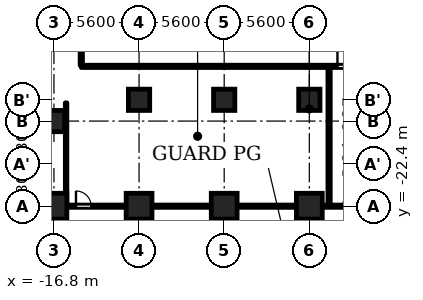
"""IFC4 building model, lengths in metres.
Left out: names, types, materials, properties, quantities, classifications, styles, units other than length and angle.
Written with IfcOpenShell. Run it as: python <this file> out.ifc"""

import sys

from ifc_helpers import new_model, si_unit, direction, frame, frame_2d, origin, origin_2d, place, context, subcontext, project, spatial, rectangle, extrude, element, fill, save


model = new_model("IFC4")
c1 = context("Model", 3, precision=1e-05, world=origin(), true_north=direction((0.0, 1.0)))
c2 = subcontext(c1, "Body", "Model", "MODEL_VIEW")
j1 = project(units=[si_unit("LENGTHUNIT", "METRE"), si_unit("PLANEANGLEUNIT", "RADIAN")], contexts=[c1])
p1 = place(None, origin())
s1 = spatial("IfcSite", under=j1, at=p1, CompositionType="ELEMENT")
p2 = place(p1, origin())
s2 = spatial("IfcBuilding", under=s1, at=p2, CompositionType="ELEMENT")
p3 = place(p2, frame((0.0, 0.0, 6.5)))
s3 = spatial("IfcBuildingStorey", under=s2, at=p3, CompositionType="ELEMENT", Elevation=6.5)
for number, where, z_axis, x_axis in (
    (1, (-16.8, -22.4, 0.0), (0.0, 0.0, 1.0), (1.0, 0.0, 0.0)),
    (2, (-11.2, -22.4, 0.0), (0.0, 0.0, 1.0), (1.0, 0.0, 0.0)),
    (3, (-5.6, -22.4, 0.0), (0.0, 0.0, 1.0), (1.0, 0.0, 0.0)),
    (4, (0.0, -22.4, 0.0), (0.0, 0.0, 1.0), (1.0, 0.0, 0.0)),
):
    element("IfcColumn", number, at=place(p3, frame(where, z_axis=z_axis, x_axis=x_axis)), inside=s3, PredefinedType="COLUMN", context=c2, shape_type="SweptSolid", body=[
        extrude(rectangle(XDim=1.7, YDim=1.7, at=origin_2d()), origin(), (0.0, 0.0, 1.0), 4.8),
    ])
for number, where, z_axis, x_axis in (
    (5, (-16.8, -16.8, 0.0), (0.0, 0.0, 1.0), (1.0, 0.0, 0.0)),
    (6, (-11.2, -15.4, 0.0), (0.0, 0.0, 1.0), (1.0, 0.0, 0.0)),
    (7, (-5.6, -15.4, 0.0), (0.0, 0.0, 1.0), (1.0, 0.0, 0.0)),
    (8, (0.0, -15.4, 0.0), (0.0, 0.0, 1.0), (1.0, 0.0, 0.0)),
):
    element("IfcColumn", number, at=place(p3, frame(where, z_axis=z_axis, x_axis=x_axis)), inside=s3, PredefinedType="COLUMN", context=c2, shape_type="SweptSolid", body=[
        extrude(rectangle(XDim=1.4, YDim=1.4, at=origin_2d()), origin(), (0.0, 0.0, 1.0), 4.8),
    ])
p4 = place(p3, frame((-18.98, -22.4, 0.0), z_axis=(0.0, 0.0, 1.0), x_axis=(1.0, 0.0, 0.0)))
e9 = element("IfcWall", 9, at=p4, inside=s3, PredefinedType="PARTITIONING", context=c2, shape_type="SweptSolid", body=[
    extrude(rectangle(XDim=38.211, YDim=0.15, at=frame_2d((19.105, 0.0))), origin(), (0.0, 0.0, 1.0), 3.55),
])
p5 = place(p4, frame((21.18, 0.0, 0.0)))
e10 = element("IfcOpeningElement", 10, at=p5, cuts=e9, PredefinedType="OPENING", context=c2, shape_type="SweptSolid", body=[
    extrude(rectangle(XDim=1.2, YDim=2.1, at=frame_2d((0.6, 1.05))), frame((0.0, 0.085, 0.0), z_axis=(0.0, -1.0, 0.0), x_axis=(1.0, 0.0, 0.0)), (0.0, 0.0, 1.0), 0.17),
])
p6 = place(p4, frame((0.08, 0.0, 0.0)))
e11 = element("IfcOpeningElement", 11, at=p6, cuts=e9, PredefinedType="OPENING", context=c2, shape_type="SweptSolid", body=[
    extrude(rectangle(XDim=1.0, YDim=2.1, at=frame_2d((0.5, 1.05))), frame((0.0, 0.085, 0.0), z_axis=(0.0, -1.0, 0.0), x_axis=(1.0, 0.0, 0.0)), (0.0, 0.0, 1.0), 0.17),
])
p7 = place(p4, frame((3.63, 0.0, 0.0)))
e12 = element("IfcOpeningElement", 12, at=p7, cuts=e9, PredefinedType="OPENING", context=c2, shape_type="SweptSolid", body=[
    extrude(rectangle(XDim=1.0, YDim=2.1, at=frame_2d((0.5, 1.05))), frame((0.0, 0.085, 0.0), z_axis=(0.0, -1.0, 0.0), x_axis=(1.0, 0.0, 0.0)), (0.0, 0.0, 1.0), 0.17),
])
p8 = place(p4, frame((27.93, 0.0, 0.0)))
e13 = element("IfcOpeningElement", 13, at=p8, cuts=e9, PredefinedType="OPENING", context=c2, shape_type="SweptSolid", body=[
    extrude(rectangle(XDim=0.9, YDim=2.1, at=frame_2d((0.45, 1.05))), frame((0.0, 0.085, 0.0), z_axis=(0.0, -1.0, 0.0), x_axis=(1.0, 0.0, 0.0)), (0.0, 0.0, 1.0), 0.17),
])
p9 = place(p4, frame((31.18, 0.0, 0.0)))
e14 = element("IfcOpeningElement", 14, at=p9, cuts=e9, PredefinedType="OPENING", context=c2, shape_type="SweptSolid", body=[
    extrude(rectangle(XDim=0.9, YDim=2.1, at=frame_2d((0.45, 1.05))), frame((0.0, 0.085, 0.0), z_axis=(0.0, -1.0, 0.0), x_axis=(1.0, 0.0, 0.0)), (0.0, 0.0, 1.0), 0.17),
])
p10 = place(p4, frame((33.88, 0.0, 0.0)))
e15 = element("IfcOpeningElement", 15, at=p10, cuts=e9, PredefinedType="OPENING", context=c2, shape_type="SweptSolid", body=[
    extrude(rectangle(XDim=0.9, YDim=2.1, at=frame_2d((0.45, 1.05))), frame((0.0, 0.085, 0.0), z_axis=(0.0, -1.0, 0.0), x_axis=(1.0, 0.0, 0.0)), (0.0, 0.0, 1.0), 0.17),
])
p11 = place(p4, frame((37.231, 0.0, 0.0)))
e16 = element("IfcOpeningElement", 16, at=p11, cuts=e9, PredefinedType="OPENING", context=c2, shape_type="SweptSolid", body=[
    extrude(rectangle(XDim=0.9, YDim=2.1, at=frame_2d((0.45, 1.05))), frame((0.0, 0.085, 0.0), z_axis=(0.0, -1.0, 0.0), x_axis=(1.0, 0.0, 0.0)), (0.0, 0.0, 1.0), 0.17),
])
p12 = place(p3, frame((-15.005, -13.2, 0.0), z_axis=(0.0, 0.0, 1.0), x_axis=(1.0, 0.0, 0.0)))
e17 = element("IfcWall", 17, at=p12, inside=s3, PredefinedType="PARTITIONING", context=c2, shape_type="SweptSolid", body=[
    extrude(rectangle(XDim=30.01, YDim=0.15, at=frame_2d((15.005, 0.0))), origin(), (0.0, 0.0, 1.0), 4.45),
])
p13 = place(p12, frame((16.855, 0.0, 0.0)))
e18 = element("IfcOpeningElement", 18, at=p13, cuts=e17, PredefinedType="OPENING", context=c2, shape_type="SweptSolid", body=[
    extrude(rectangle(XDim=1.8, YDim=2.1, at=frame_2d((0.9, 1.05))), frame((0.0, 0.085, 0.0), z_axis=(0.0, -1.0, 0.0), x_axis=(1.0, 0.0, 0.0)), (0.0, 0.0, 1.0), 0.17),
])
p14 = place(p3, frame((-16.0, -22.325, 0.0), z_axis=(0.0, 0.0, 1.0), x_axis=(0.0, 1.0, 0.0)))
e19 = element("IfcWall", 19, at=p14, inside=s3, PredefinedType="PARTITIONING", context=c2, shape_type="SweptSolid", body=[
    extrude(rectangle(XDim=6.725, YDim=0.1, at=frame_2d((3.362, 0.0))), origin(), (0.0, 0.0, 1.0), 4.45),
])
p15 = place(p3, frame((-15.0, -13.125, 0.0), z_axis=(0.0, 0.0, 1.0), x_axis=(0.0, 1.0, 0.0)))
e20 = element("IfcWall", 20, at=p15, inside=s3, PredefinedType="PARTITIONING", context=c2, shape_type="SweptSolid", body=[
    extrude(rectangle(XDim=6.356, YDim=0.15, at=frame_2d((3.178, 0.0))), origin(), (0.0, 0.0, 1.0), 4.45),
])
p16 = place(p3, frame((1.3, -22.325, 0.0), z_axis=(0.0, 0.0, 1.0), x_axis=(0.0, 1.0, 0.0)))
e21 = element("IfcWall", 21, at=p16, inside=s3, PredefinedType="PARTITIONING", context=c2, shape_type="SweptSolid", body=[
    extrude(rectangle(XDim=9.05, YDim=0.15, at=frame_2d((4.525, 0.0))), origin(), (0.0, 0.0, 1.0), 4.45),
])
p17 = place(p13, origin())
e22 = element("IfcDoor", 22, at=p17, inside=s3, OperationType="SINGLE_SWING_RIGHT", PredefinedType="DOOR", context=c2, shape_type="SweptSolid", body=[
    extrude(rectangle(XDim=1.8, YDim=2.1, at=frame_2d((0.9, 1.05))), frame((0.0, 0.025, 0.0), z_axis=(0.0, -1.0, 0.0), x_axis=(1.0, 0.0, 0.0)), (0.0, 0.0, 1.0), 0.05),
])
fill(e18, e22)
p18 = place(p5, origin())
e23 = element("IfcDoor", 23, at=p18, inside=s3, OperationType="SINGLE_SWING_LEFT", PredefinedType="DOOR", context=c2, shape_type="SweptSolid", body=[
    extrude(rectangle(XDim=1.2, YDim=2.1, at=frame_2d((0.6, 1.05))), frame((0.0, 0.025, 0.0), z_axis=(0.0, -1.0, 0.0), x_axis=(1.0, 0.0, 0.0)), (0.0, 0.0, 1.0), 0.05),
])
fill(e10, e23)
p19 = place(p7, origin())
e24 = element("IfcDoor", 24, at=p19, inside=s3, OperationType="SINGLE_SWING_RIGHT", PredefinedType="DOOR", context=c2, shape_type="SweptSolid", body=[
    extrude(rectangle(XDim=1.0, YDim=2.1, at=frame_2d((0.5, 1.05))), frame((0.0, 0.025, 0.0), z_axis=(0.0, -1.0, 0.0), x_axis=(1.0, 0.0, 0.0)), (0.0, 0.0, 1.0), 0.05),
])
fill(e12, e24)
save(model, sys.argv[1])
